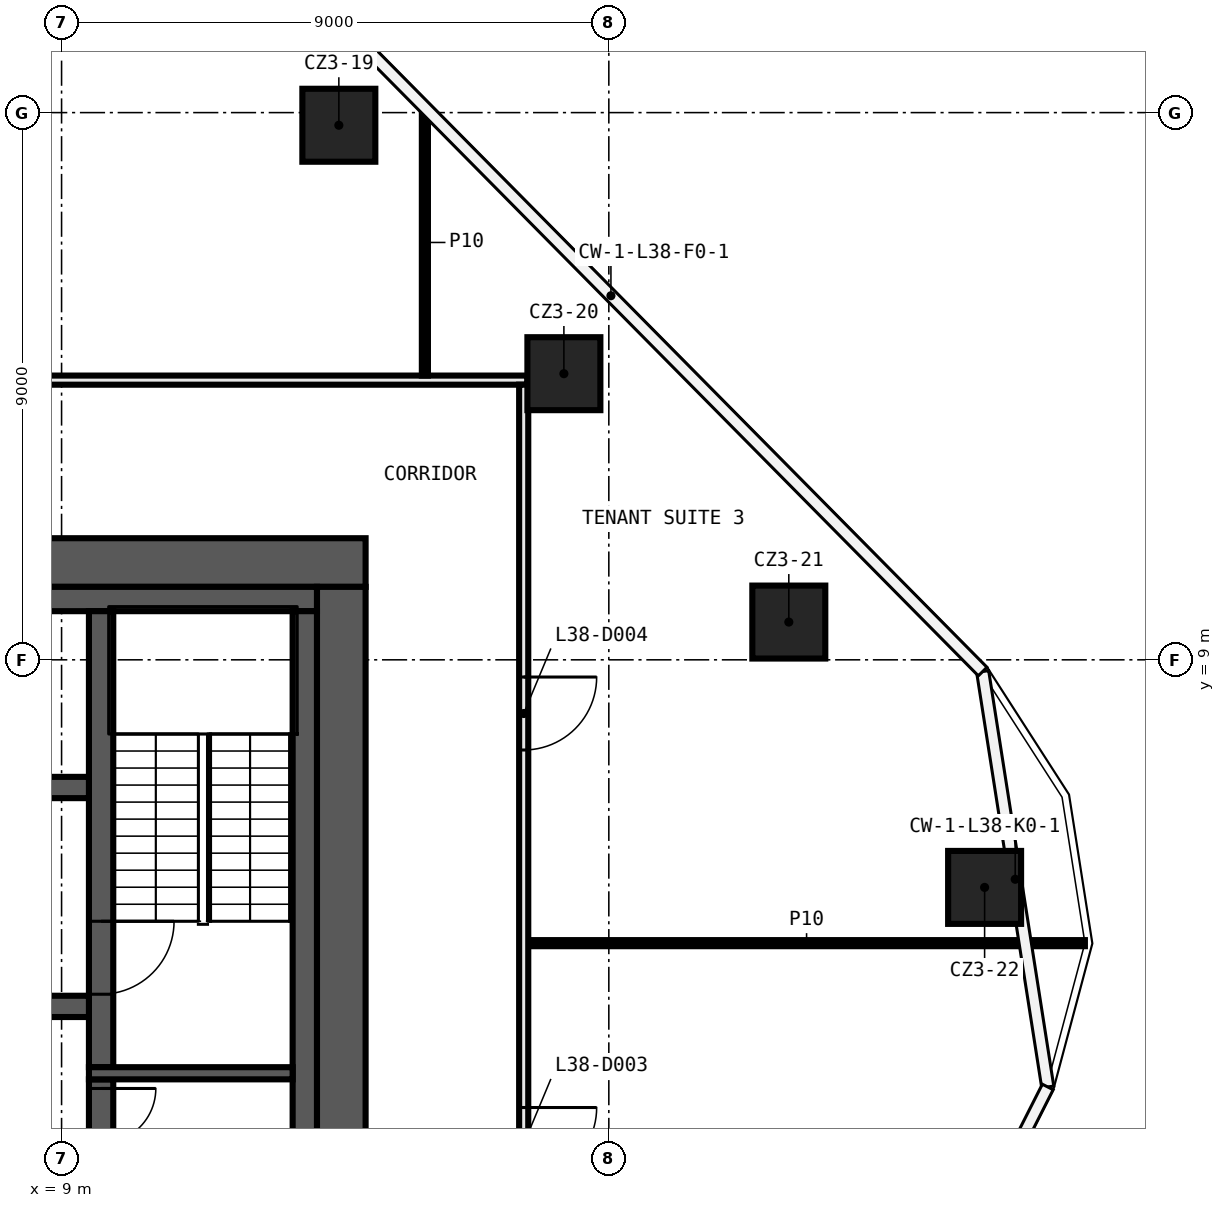
"""IFC4 building model, lengths in metres.
Left out: names, types, materials, properties, quantities, classifications, styles, units other than length and angle.
Written with IfcOpenShell. Run it as: python <this file> out.ifc"""

import sys

from ifc_helpers import new_model, si_unit, direction, frame, frame_2d, origin, origin_2d, place, context, subcontext, project, spatial, rectangle, extrude, element, fill, save


model = new_model("IFC4")
c1 = context("Model", 3, precision=1e-05, world=origin(), true_north=direction((0.0, 1.0)))
c2 = subcontext(c1, "Body", "Model", "MODEL_VIEW")
j1 = project(units=[si_unit("LENGTHUNIT", "METRE"), si_unit("PLANEANGLEUNIT", "RADIAN")], contexts=[c1])
p1 = place(None, origin())
s1 = spatial("IfcSite", under=j1, at=p1, CompositionType="ELEMENT")
p2 = place(p1, origin())
s2 = spatial("IfcBuilding", under=s1, at=p2, CompositionType="ELEMENT")
p3 = place(p2, frame((0.0, 0.0, 175.4)))
s3 = spatial("IfcBuildingStorey", under=s2, at=p3, CompositionType="ELEMENT", Elevation=175.4)
for number, where, z_axis, x_axis in (
    (1, (13.56, 17.792, 0.0), (0.0, 0.0, 1.0), (1.0, 0.0, 0.0)),
    (2, (17.261, 13.706, 0.0), (0.0, 0.0, 1.0), (1.0, 0.0, 0.0)),
    (3, (20.96, 9.621, 0.0), (0.0, 0.0, 1.0), (1.0, 0.0, 0.0)),
    (4, (24.18, 5.257, 0.0), (0.0, 0.0, 1.0), (1.0, 0.0, 0.0)),
):
    element("IfcColumn", number, at=place(p3, frame(where, z_axis=z_axis, x_axis=x_axis)), inside=s3, PredefinedType="COLUMN", context=c2, shape_type="SweptSolid", body=[
        extrude(rectangle(XDim=1.2, YDim=1.2, at=origin_2d()), origin(), (0.0, 0.0, 1.0), 3.82),
    ])
p4 = place(p3, frame((16.675, 4.34, 0.0), z_axis=(0.0, 0.0, 1.0), x_axis=(1.0, 0.0, 0.0)))
e5 = element("IfcWall", 5, at=p4, inside=s3, PredefinedType="PARTITIONING", context=c2, shape_type="SweptSolid", body=[
    extrude(rectangle(XDim=9.154, YDim=0.1, at=frame_2d((4.577, 0.0))), origin(), (0.0, 0.0, 1.0), 3.82),
])
p5 = place(p3, frame((-15.842, 13.6, 0.0), z_axis=(0.0, 0.0, 1.0), x_axis=(1.0, 0.0, 0.0)))
e6 = element("IfcWall", 6, at=p5, inside=s3, PredefinedType="PARTITIONING", context=c2, shape_type="SweptSolid", body=[
    extrude(rectangle(XDim=32.502, YDim=0.15, at=frame_2d((16.251, 0.0))), origin(), (0.0, 0.0, 1.0), 3.82),
])
p6 = place(p5, frame((21.974, 0.0, 0.0)))
e7 = element("IfcOpeningElement", 7, at=p6, cuts=e6, PredefinedType="OPENING", context=c2, shape_type="SweptSolid", body=[
    extrude(rectangle(XDim=1.2, YDim=2.1, at=frame_2d((0.6, 1.05))), frame((0.0, 0.085, 0.0), z_axis=(0.0, -1.0, 0.0), x_axis=(1.0, 0.0, 0.0)), (0.0, 0.0, 1.0), 0.17),
])
p7 = place(p5, frame((5.854, 0.0, 0.0)))
e8 = element("IfcOpeningElement", 8, at=p7, cuts=e6, PredefinedType="OPENING", context=c2, shape_type="SweptSolid", body=[
    extrude(rectangle(XDim=1.2, YDim=2.1, at=frame_2d((0.6, 1.05))), frame((0.0, 0.085, 0.0), z_axis=(0.0, -1.0, 0.0), x_axis=(1.0, 0.0, 0.0)), (0.0, 0.0, 1.0), 0.17),
])
p8 = place(p3, frame((16.6, 13.525, 0.0), z_axis=(0.0, 0.0, 1.0), x_axis=(0.0, -1.0, 0.0)))
e9 = element("IfcWall", 9, at=p8, inside=s3, PredefinedType="PARTITIONING", context=c2, shape_type="SweptSolid", body=[
    extrude(rectangle(XDim=24.975, YDim=0.15, at=frame_2d((12.487, 0.0))), origin(), (0.0, 0.0, 1.0), 3.82),
])
p9 = place(p8, frame((11.888, 0.0, 0.0)))
e10 = element("IfcOpeningElement", 10, at=p9, cuts=e9, PredefinedType="OPENING", context=c2, shape_type="SweptSolid", body=[
    extrude(rectangle(XDim=1.2, YDim=2.1, at=frame_2d((0.6, 1.05))), frame((0.0, 0.085, 0.0), z_axis=(0.0, -1.0, 0.0), x_axis=(1.0, 0.0, 0.0)), (0.0, 0.0, 1.0), 0.17),
])
p10 = place(p8, frame((4.808, 0.0, 0.0)))
e11 = element("IfcOpeningElement", 11, at=p10, cuts=e9, PredefinedType="OPENING", context=c2, shape_type="SweptSolid", body=[
    extrude(rectangle(XDim=1.2, YDim=2.1, at=frame_2d((0.6, 1.05))), frame((0.0, 0.085, 0.0), z_axis=(0.0, -1.0, 0.0), x_axis=(1.0, 0.0, 0.0)), (0.0, 0.0, 1.0), 0.17),
])
p11 = place(p3, frame((14.975, 13.675, 0.0), z_axis=(0.0, 0.0, 1.0), x_axis=(0.0, 1.0, 0.0)))
e12 = element("IfcWall", 12, at=p11, inside=s3, PredefinedType="PARTITIONING", context=c2, shape_type="SweptSolid", body=[
    extrude(rectangle(XDim=4.379, YDim=0.1, at=frame_2d((2.189, 0.0))), origin(), (0.0, 0.0, 1.0), 3.82),
])
p12 = place(p3, frame((-14.0, 10.6, 0.0), z_axis=(0.0, 0.0, 1.0), x_axis=(1.0, 0.0, 0.0)))
e13 = element("IfcWall", 13, at=p12, inside=s3, PredefinedType="SHEAR", context=c2, shape_type="SweptSolid", body=[
    extrude(rectangle(XDim=28.0, YDim=0.8, at=frame_2d((14.0, 0.0))), origin(), (0.0, 0.0, 1.0), 3.82),
])
p13 = place(p12, frame((15.9, 0.0, 0.0)))
e14 = element("IfcOpeningElement", 14, at=p13, cuts=e13, PredefinedType="OPENING", context=c2, shape_type="SweptSolid", body=[
    extrude(rectangle(XDim=1.6, YDim=2.1, at=frame_2d((0.8, 1.05))), frame((0.0, 0.41, 0.0), z_axis=(0.0, -1.0, 0.0), x_axis=(1.0, 0.0, 0.0)), (0.0, 0.0, 1.0), 0.82),
])
p14 = place(p3, frame((13.6, 10.2, 0.0), z_axis=(0.0, 0.0, 1.0), x_axis=(0.0, -1.0, 0.0)))
e15 = element("IfcWall", 15, at=p14, inside=s3, PredefinedType="SHEAR", context=c2, shape_type="SweptSolid", body=[
    extrude(rectangle(XDim=20.4, YDim=0.8, at=frame_2d((10.2, 0.0))), origin(), (0.0, 0.0, 1.0), 3.82),
])
p15 = place(p3, frame((3.9, 10.0, 0.0), z_axis=(0.0, 0.0, 1.0), x_axis=(1.0, 0.0, 0.0)))
e16 = element("IfcWall", 16, at=p15, inside=s3, PredefinedType="SHEAR", context=c2, shape_type="SweptSolid", body=[
    extrude(rectangle(XDim=9.3, YDim=0.4, at=frame_2d((4.65, 0.0))), origin(), (0.0, 0.0, 1.0), 3.82),
])
p16 = place(p3, frame((13.0, 9.8, 0.0), z_axis=(0.0, 0.0, 1.0), x_axis=(0.0, -1.0, 0.0)))
e17 = element("IfcWall", 17, at=p16, inside=s3, PredefinedType="SHEAR", context=c2, shape_type="SweptSolid", body=[
    extrude(rectangle(XDim=19.6, YDim=0.4, at=frame_2d((9.8, 0.0))), origin(), (0.0, 0.0, 1.0), 3.82),
])
p17 = place(p3, frame((9.65, 2.1, 0.0), z_axis=(0.0, 0.0, 1.0), x_axis=(0.0, -1.0, 0.0)))
e18 = element("IfcWall", 18, at=p17, inside=s3, PredefinedType="SHEAR", context=c2, shape_type="SweptSolid", body=[
    extrude(rectangle(XDim=4.2, YDim=0.4, at=frame_2d((2.1, 0.0))), origin(), (0.0, 0.0, 1.0), 3.82),
])
p18 = place(p17, frame((0.15, 0.0, 0.0)))
e19 = element("IfcOpeningElement", 19, at=p18, cuts=e18, PredefinedType="OPENING", context=c2, shape_type="SweptSolid", body=[
    extrude(rectangle(XDim=0.9, YDim=2.1, at=frame_2d((0.45, 1.05))), frame((0.0, 0.21, 0.0), z_axis=(0.0, -1.0, 0.0), x_axis=(1.0, 0.0, 0.0)), (0.0, 0.0, 1.0), 0.42),
])
p19 = place(p3, frame((9.65, 9.8, 0.0), z_axis=(0.0, 0.0, 1.0), x_axis=(0.0, -1.0, 0.0)))
e20 = element("IfcWall", 20, at=p19, inside=s3, PredefinedType="SHEAR", context=c2, shape_type="SweptSolid", body=[
    extrude(rectangle(XDim=7.5, YDim=0.4, at=frame_2d((3.75, 0.0))), origin(), (0.0, 0.0, 1.0), 3.82),
])
p20 = place(p19, frame((5.1, 0.0, 0.0)))
e21 = element("IfcOpeningElement", 21, at=p20, cuts=e20, PredefinedType="OPENING", context=c2, shape_type="SweptSolid", body=[
    extrude(rectangle(XDim=1.2, YDim=2.1, at=frame_2d((0.6, 1.05))), frame((0.0, 0.21, 0.0), z_axis=(0.0, -1.0, 0.0), x_axis=(1.0, 0.0, 0.0)), (0.0, 0.0, 1.0), 0.42),
])
p21 = place(p3, frame((9.45, 2.2, 0.0), z_axis=(0.0, 0.0, 1.0), x_axis=(1.0, 0.0, 0.0)))
e22 = element("IfcWall", 22, at=p21, inside=s3, PredefinedType="SHEAR", context=c2, shape_type="SweptSolid", body=[
    extrude(rectangle(XDim=3.35, YDim=0.2, at=frame_2d((1.675, 0.0))), origin(), (0.0, 0.0, 1.0), 3.82),
])
p22 = place(p3, frame((-9.45, 6.9, 0.0), z_axis=(0.0, 0.0, 1.0), x_axis=(1.0, 0.0, 0.0)))
e23 = element("IfcWall", 23, at=p22, inside=s3, PredefinedType="SHEAR", context=c2, shape_type="SweptSolid", body=[
    extrude(rectangle(XDim=18.9, YDim=0.35, at=frame_2d((9.45, 0.0))), origin(), (0.0, 0.0, 1.0), 3.82),
])
p23 = place(p22, frame((11.55, 0.0, 0.0)))
e24 = element("IfcOpeningElement", 24, at=p23, cuts=e23, PredefinedType="OPENING", context=c2, shape_type="SweptSolid", body=[
    extrude(rectangle(XDim=1.2, YDim=2.1, at=frame_2d((0.6, 1.05))), frame((0.0, 0.185, 0.0), z_axis=(0.0, -1.0, 0.0), x_axis=(1.0, 0.0, 0.0)), (0.0, 0.0, 1.0), 0.37),
])
p24 = place(p22, frame((14.3, 0.0, 0.0)))
e25 = element("IfcOpeningElement", 25, at=p24, cuts=e23, PredefinedType="OPENING", context=c2, shape_type="SweptSolid", body=[
    extrude(rectangle(XDim=1.1, YDim=2.1, at=frame_2d((0.55, 1.05))), frame((0.0, 0.185, 0.0), z_axis=(0.0, -1.0, 0.0), x_axis=(1.0, 0.0, 0.0)), (0.0, 0.0, 1.0), 0.37),
])
p25 = place(p22, frame((17.0, 0.0, 0.0)))
e26 = element("IfcOpeningElement", 26, at=p25, cuts=e23, PredefinedType="OPENING", context=c2, shape_type="SweptSolid", body=[
    extrude(rectangle(XDim=1.1, YDim=2.1, at=frame_2d((0.55, 1.05))), frame((0.0, 0.185, 0.0), z_axis=(0.0, -1.0, 0.0), x_axis=(1.0, 0.0, 0.0)), (0.0, 0.0, 1.0), 0.37),
])
p26 = place(p22, frame((3.6, 0.0, 0.0)))
e27 = element("IfcOpeningElement", 27, at=p26, cuts=e23, PredefinedType="OPENING", context=c2, shape_type="SweptSolid", body=[
    extrude(rectangle(XDim=0.9, YDim=2.1, at=frame_2d((0.45, 1.05))), frame((0.0, 0.185, 0.0), z_axis=(0.0, -1.0, 0.0), x_axis=(1.0, 0.0, 0.0)), (0.0, 0.0, 1.0), 0.37),
])
p27 = place(p22, frame((9.0, 0.0, 0.0)))
e28 = element("IfcOpeningElement", 28, at=p27, cuts=e23, PredefinedType="OPENING", context=c2, shape_type="SweptSolid", body=[
    extrude(rectangle(XDim=0.9, YDim=2.1, at=frame_2d((0.45, 1.05))), frame((0.0, 0.185, 0.0), z_axis=(0.0, -1.0, 0.0), x_axis=(1.0, 0.0, 0.0)), (0.0, 0.0, 1.0), 0.37),
])
p28 = place(p3, frame((9.45, 3.3, 0.0), z_axis=(0.0, 0.0, 1.0), x_axis=(-1.0, 0.0, 0.0)))
e29 = element("IfcWall", 29, at=p28, inside=s3, PredefinedType="SHEAR", context=c2, shape_type="SweptSolid", body=[
    extrude(rectangle(XDim=18.9, YDim=0.35, at=frame_2d((9.45, 0.0))), origin(), (0.0, 0.0, 1.0), 3.82),
])
p29 = place(p28, frame((6.2, 0.0, 0.0)))
e30 = element("IfcOpeningElement", 30, at=p29, cuts=e29, PredefinedType="OPENING", context=c2, shape_type="SweptSolid", body=[
    extrude(rectangle(XDim=1.1, YDim=2.1, at=frame_2d((0.55, 1.05))), frame((0.0, 0.185, 0.0), z_axis=(0.0, -1.0, 0.0), x_axis=(1.0, 0.0, 0.0)), (0.0, 0.0, 1.0), 0.37),
])
p30 = place(p28, frame((3.5, 0.0, 0.0)))
e31 = element("IfcOpeningElement", 31, at=p30, cuts=e29, PredefinedType="OPENING", context=c2, shape_type="SweptSolid", body=[
    extrude(rectangle(XDim=1.1, YDim=2.1, at=frame_2d((0.55, 1.05))), frame((0.0, 0.185, 0.0), z_axis=(0.0, -1.0, 0.0), x_axis=(1.0, 0.0, 0.0)), (0.0, 0.0, 1.0), 0.37),
])
p31 = place(p28, frame((0.9, 0.0, 0.0)))
e32 = element("IfcOpeningElement", 32, at=p31, cuts=e29, PredefinedType="OPENING", context=c2, shape_type="SweptSolid", body=[
    extrude(rectangle(XDim=0.9, YDim=2.1, at=frame_2d((0.45, 1.05))), frame((0.0, 0.185, 0.0), z_axis=(0.0, -1.0, 0.0), x_axis=(1.0, 0.0, 0.0)), (0.0, 0.0, 1.0), 0.37),
])
p32 = place(p28, frame((14.4, 0.0, 0.0)))
e33 = element("IfcOpeningElement", 33, at=p32, cuts=e29, PredefinedType="OPENING", context=c2, shape_type="SweptSolid", body=[
    extrude(rectangle(XDim=0.9, YDim=2.1, at=frame_2d((0.45, 1.05))), frame((0.0, 0.185, 0.0), z_axis=(0.0, -1.0, 0.0), x_axis=(1.0, 0.0, 0.0)), (0.0, 0.0, 1.0), 0.37),
])
p33 = place(p28, frame((9.0, 0.0, 0.0)))
e34 = element("IfcOpeningElement", 34, at=p33, cuts=e29, PredefinedType="OPENING", context=c2, shape_type="SweptSolid", body=[
    extrude(rectangle(XDim=0.9, YDim=2.1, at=frame_2d((0.45, 1.05))), frame((0.0, 0.185, 0.0), z_axis=(0.0, -1.0, 0.0), x_axis=(1.0, 0.0, 0.0)), (0.0, 0.0, 1.0), 0.37),
])
p34 = place(p9, origin())
e35 = element("IfcDoor", 35, at=p34, inside=s3, OperationType="SINGLE_SWING_RIGHT", PredefinedType="DOOR", context=c2, shape_type="SweptSolid", body=[
    extrude(rectangle(XDim=1.2, YDim=2.1, at=frame_2d((0.6, 1.05))), frame((0.0, 0.025, 0.0), z_axis=(0.0, -1.0, 0.0), x_axis=(1.0, 0.0, 0.0)), (0.0, 0.0, 1.0), 0.05),
])
fill(e10, e35)
p35 = place(p10, origin())
e36 = element("IfcDoor", 36, at=p35, inside=s3, OperationType="SINGLE_SWING_LEFT", PredefinedType="DOOR", context=c2, shape_type="SweptSolid", body=[
    extrude(rectangle(XDim=1.2, YDim=2.1, at=frame_2d((0.6, 1.05))), frame((0.0, 0.025, 0.0), z_axis=(0.0, -1.0, 0.0), x_axis=(1.0, 0.0, 0.0)), (0.0, 0.0, 1.0), 0.05),
])
fill(e11, e36)
p36 = place(p18, origin())
e37 = element("IfcDoor", 37, at=p36, inside=s3, OperationType="SINGLE_SWING_RIGHT", PredefinedType="DOOR", context=c2, shape_type="SweptSolid", body=[
    extrude(rectangle(XDim=0.9, YDim=2.1, at=frame_2d((0.45, 1.05))), frame((0.0, 0.025, 0.0), z_axis=(0.0, -1.0, 0.0), x_axis=(1.0, 0.0, 0.0)), (0.0, 0.0, 1.0), 0.05),
])
fill(e19, e37)
p37 = place(p20, origin())
e38 = element("IfcDoor", 38, at=p37, inside=s3, OperationType="SINGLE_SWING_LEFT", PredefinedType="DOOR", context=c2, shape_type="SweptSolid", body=[
    extrude(rectangle(XDim=1.2, YDim=2.1, at=frame_2d((0.6, 1.05))), frame((0.0, 0.025, 0.0), z_axis=(0.0, -1.0, 0.0), x_axis=(1.0, 0.0, 0.0)), (0.0, 0.0, 1.0), 0.05),
])
fill(e21, e38)
save(model, sys.argv[1])
